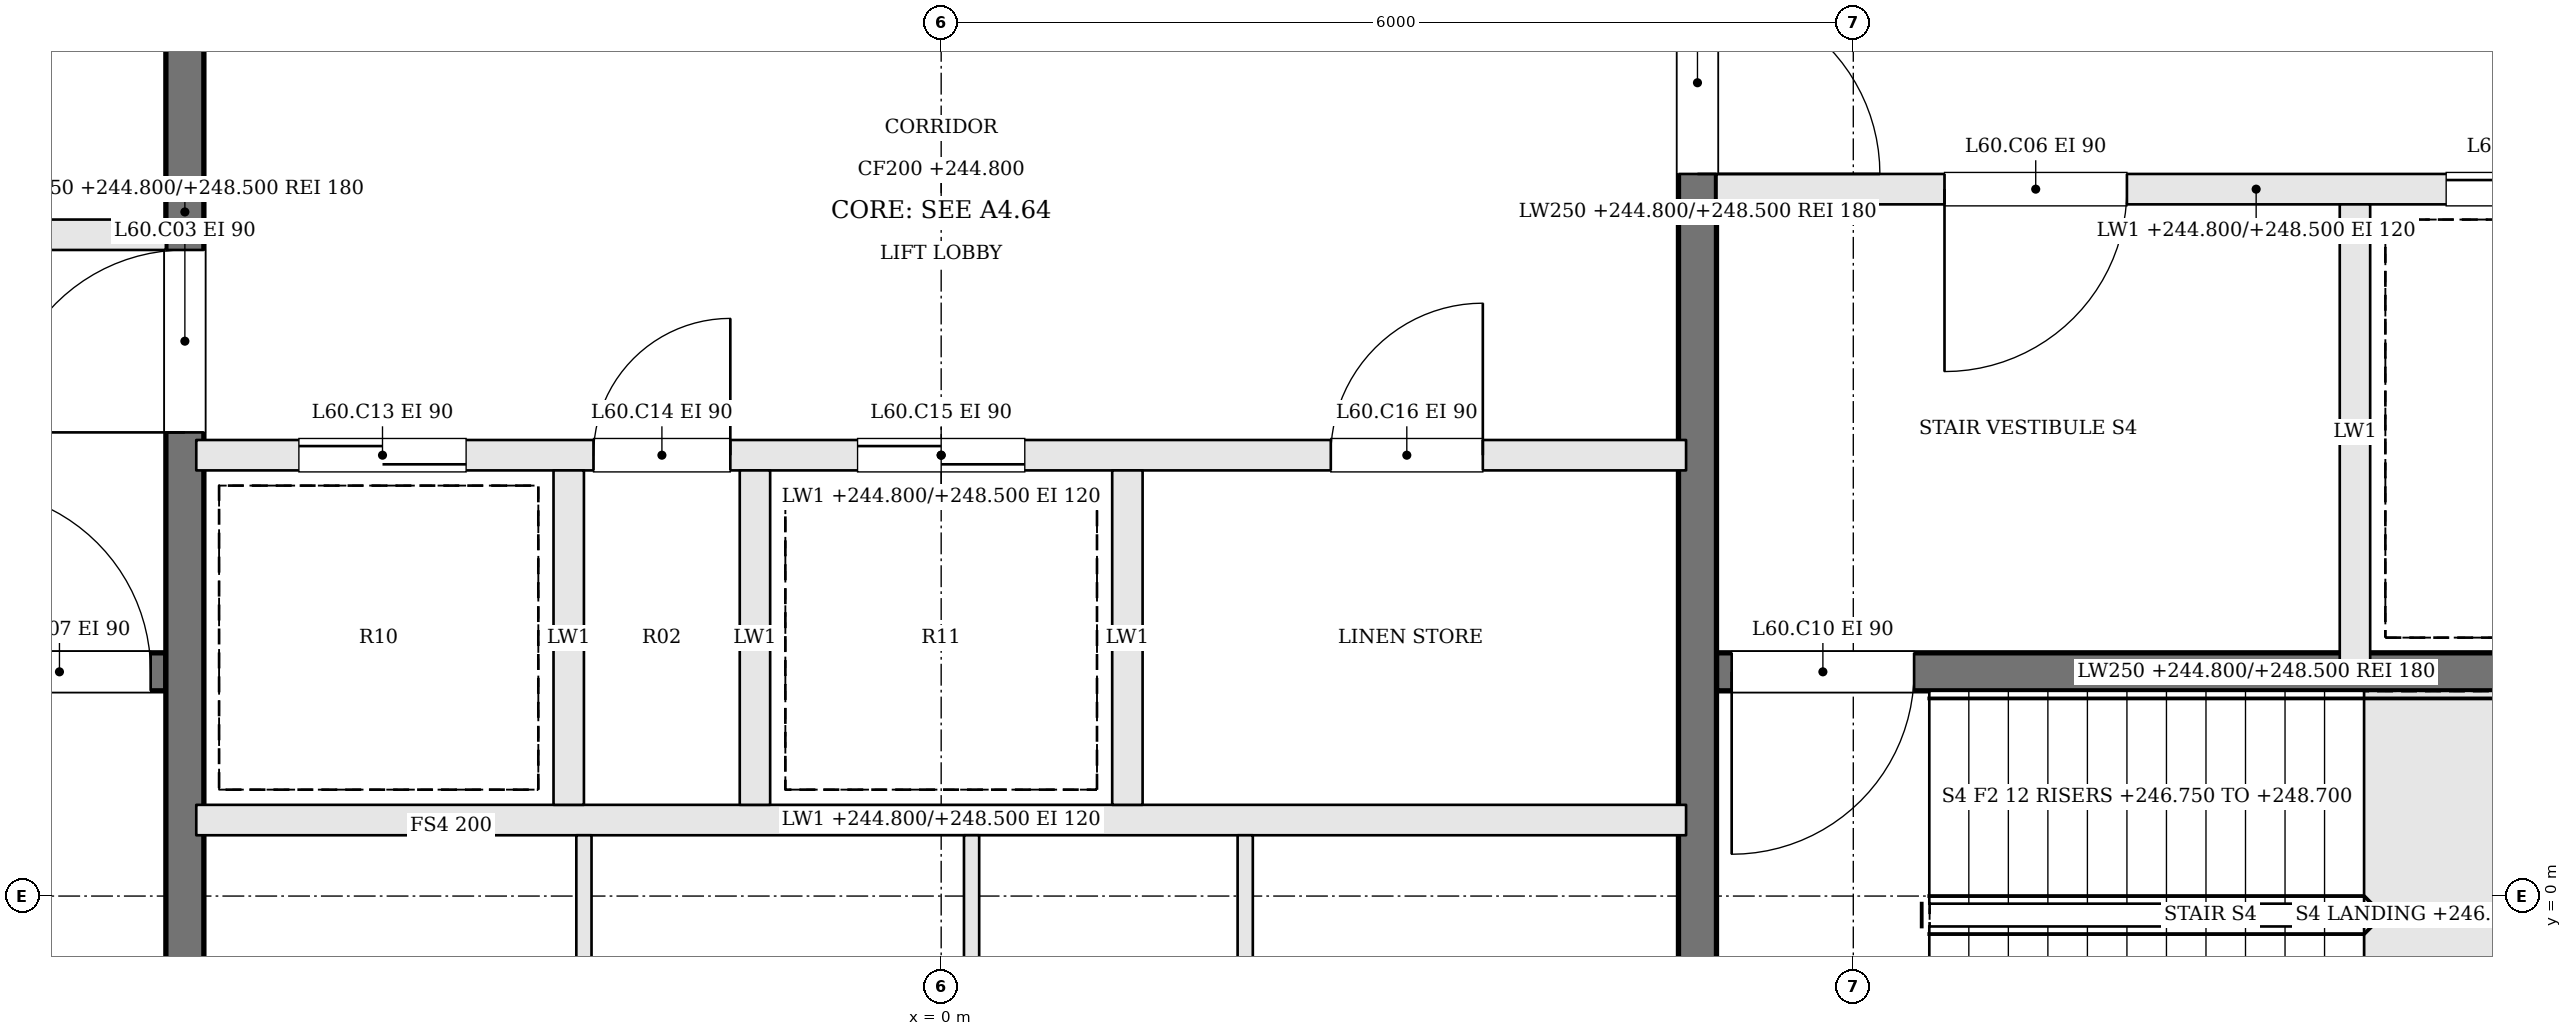
"""IFC4 building model, lengths in metres.
Left out: names, types, materials, properties, quantities, classifications, styles, units other than length and angle.
Written with IfcOpenShell. Run it as: python <this file> out.ifc"""

import sys

from ifc_helpers import new_model, si_unit, direction, frame, frame_2d, origin, place, context, subcontext, project, spatial, rectangle, extrude, element, fill, save


model = new_model("IFC4")
c1 = context("Model", 3, precision=1e-05, world=origin(), true_north=direction((0.0, 1.0)))
c2 = subcontext(c1, "Body", "Model", "MODEL_VIEW")
j1 = project(units=[si_unit("LENGTHUNIT", "METRE"), si_unit("PLANEANGLEUNIT", "RADIAN")], contexts=[c1])
p1 = place(None, origin())
s1 = spatial("IfcSite", under=j1, at=p1, CompositionType="ELEMENT")
p2 = place(p1, origin())
s2 = spatial("IfcBuilding", under=s1, at=p2, CompositionType="ELEMENT")
p3 = place(p2, frame((0.0, 0.0, 244.8)))
s3 = spatial("IfcBuildingStorey", under=s2, at=p3, CompositionType="ELEMENT", Elevation=244.8)
p4 = place(p3, frame((-12.2, 1.475, 0.0), z_axis=(0.0, 0.0, 1.0), x_axis=(1.0, 0.0, 0.0)))
e1 = element("IfcWall", 1, at=p4, inside=s3, PredefinedType="SOLIDWALL", context=c2, shape_type="SweptSolid", body=[
    extrude(rectangle(XDim=7.1, YDim=0.25, at=frame_2d((3.55, 0.0))), origin(), (0.0, 0.0, 1.0), 3.7),
])
p5 = place(p4, frame((5.8, 0.0, 0.0)))
e2 = element("IfcOpeningElement", 2, at=p5, cuts=e1, PredefinedType="OPENING", context=c2, shape_type="SweptSolid", body=[
    extrude(rectangle(XDim=1.2, YDim=2.1, at=frame_2d((0.6, 1.05))), frame((0.0, 0.135, 0.0), z_axis=(0.0, -1.0, 0.0), x_axis=(1.0, 0.0, 0.0)), (0.0, 0.0, 1.0), 0.27),
])
p6 = place(p3, frame((-12.2, 4.35, 0.0), z_axis=(0.0, 0.0, 1.0), x_axis=(1.0, 0.0, 0.0)))
e3 = element("IfcWall", 3, at=p6, inside=s3, PredefinedType="SOLIDWALL", context=c2, shape_type="SweptSolid", body=[
    extrude(rectangle(XDim=7.1, YDim=0.2, at=frame_2d((3.55, 0.0))), origin(), (0.0, 0.0, 1.0), 3.7),
])
p7 = place(p6, frame((4.4, 0.0, 0.0)))
e4 = element("IfcOpeningElement", 4, at=p7, cuts=e3, PredefinedType="OPENING", context=c2, shape_type="SweptSolid", body=[
    extrude(rectangle(XDim=1.2, YDim=2.1, at=frame_2d((0.6, 1.05))), frame((0.0, 0.11, 0.0), z_axis=(0.0, -1.0, 0.0), x_axis=(1.0, 0.0, 0.0)), (0.0, 0.0, 1.0), 0.22),
])
p8 = place(p6, frame((1.1, 0.0, 0.0)))
e5 = element("IfcOpeningElement", 5, at=p8, cuts=e3, PredefinedType="OPENING", context=c2, shape_type="SweptSolid", body=[
    extrude(rectangle(XDim=1.2, YDim=2.1, at=frame_2d((0.6, 1.05))), frame((0.0, 0.11, 0.0), z_axis=(0.0, -1.0, 0.0), x_axis=(1.0, 0.0, 0.0)), (0.0, 0.0, 1.0), 0.22),
])
p9 = place(p3, frame((12.2, 4.65, 0.0), z_axis=(0.0, 0.0, 1.0), x_axis=(-1.0, 0.0, 0.0)))
e6 = element("IfcWall", 6, at=p9, inside=s3, PredefinedType="SOLIDWALL", context=c2, shape_type="SweptSolid", body=[
    extrude(rectangle(XDim=7.1, YDim=0.2, at=frame_2d((3.55, 0.0))), origin(), (0.0, 0.0, 1.0), 3.7),
])
p10 = place(p9, frame((4.4, 0.0, 0.0)))
e7 = element("IfcOpeningElement", 7, at=p10, cuts=e6, PredefinedType="OPENING", context=c2, shape_type="SweptSolid", body=[
    extrude(rectangle(XDim=1.2, YDim=2.1, at=frame_2d((0.6, 1.05))), frame((0.0, 0.11, 0.0), z_axis=(0.0, -1.0, 0.0), x_axis=(1.0, 0.0, 0.0)), (0.0, 0.0, 1.0), 0.22),
])
p11 = place(p9, frame((1.1, 0.0, 0.0)))
e8 = element("IfcOpeningElement", 8, at=p11, cuts=e6, PredefinedType="OPENING", context=c2, shape_type="SweptSolid", body=[
    extrude(rectangle(XDim=1.2, YDim=2.1, at=frame_2d((0.6, 1.05))), frame((0.0, 0.11, 0.0), z_axis=(0.0, -1.0, 0.0), x_axis=(1.0, 0.0, 0.0)), (0.0, 0.0, 1.0), 0.22),
])
p12 = place(p3, frame((12.2, 1.475, 0.0), z_axis=(0.0, 0.0, 1.0), x_axis=(-1.0, 0.0, 0.0)))
e9 = element("IfcWall", 9, at=p12, inside=s3, PredefinedType="SOLIDWALL", context=c2, shape_type="SweptSolid", body=[
    extrude(rectangle(XDim=7.1, YDim=0.25, at=frame_2d((3.55, 0.0))), origin(), (0.0, 0.0, 1.0), 3.7),
])
p13 = place(p12, frame((5.8, 0.0, 0.0)))
e10 = element("IfcOpeningElement", 10, at=p13, cuts=e9, PredefinedType="OPENING", context=c2, shape_type="SweptSolid", body=[
    extrude(rectangle(XDim=1.2, YDim=2.1, at=frame_2d((0.6, 1.05))), frame((0.0, 0.135, 0.0), z_axis=(0.0, -1.0, 0.0), x_axis=(1.0, 0.0, 0.0)), (0.0, 0.0, 1.0), 0.27),
])
p14 = place(p3, frame((9.3, 4.55, 0.0), z_axis=(0.0, 0.0, 1.0), x_axis=(0.0, -1.0, 0.0)))
e11 = element("IfcWall", 11, at=p14, inside=s3, PredefinedType="SOLIDWALL", context=c2, shape_type="SweptSolid", body=[
    extrude(rectangle(XDim=3.0, YDim=0.2, at=frame_2d((1.5, 0.0))), origin(), (0.0, 0.0, 1.0), 3.7),
])
p15 = place(p3, frame((-4.975, -2.2, 0.0), z_axis=(0.0, 0.0, 1.0), x_axis=(0.0, 1.0, 0.0)))
e12 = element("IfcWall", 12, at=p15, inside=s3, PredefinedType="SOLIDWALL", context=c2, shape_type="SweptSolid", body=[
    extrude(rectangle(XDim=13.4, YDim=0.25, at=frame_2d((6.7, 0.0))), origin(), (0.0, 0.0, 1.0), 3.7),
])
p16 = place(p15, frame((5.25, 0.0, 0.0)))
e13 = element("IfcOpeningElement", 13, at=p16, cuts=e12, PredefinedType="OPENING", context=c2, shape_type="SweptSolid", body=[
    extrude(rectangle(XDim=1.2, YDim=2.1, at=frame_2d((0.6, 1.05))), frame((0.0, 0.135, 0.0), z_axis=(0.0, -1.0, 0.0), x_axis=(1.0, 0.0, 0.0)), (0.0, 0.0, 1.0), 0.27),
])
p17 = place(p3, frame((4.975, 11.2, 0.0), z_axis=(0.0, 0.0, 1.0), x_axis=(0.0, -1.0, 0.0)))
e14 = element("IfcWall", 14, at=p17, inside=s3, PredefinedType="SOLIDWALL", context=c2, shape_type="SweptSolid", body=[
    extrude(rectangle(XDim=13.4, YDim=0.25, at=frame_2d((6.7, 0.0))), origin(), (0.0, 0.0, 1.0), 3.7),
])
p18 = place(p17, frame((5.25, 0.0, 0.0)))
e15 = element("IfcOpeningElement", 15, at=p18, cuts=e14, PredefinedType="OPENING", context=c2, shape_type="SweptSolid", body=[
    extrude(rectangle(XDim=1.2, YDim=2.1, at=frame_2d((0.6, 1.05))), frame((0.0, 0.135, 0.0), z_axis=(0.0, -1.0, 0.0), x_axis=(1.0, 0.0, 0.0)), (0.0, 0.0, 1.0), 0.27),
])
p19 = place(p3, frame((-4.9, 0.5, 0.0), z_axis=(0.0, 0.0, 1.0), x_axis=(1.0, 0.0, 0.0)))
e16 = element("IfcWall", 16, at=p19, inside=s3, PredefinedType="SOLIDWALL", context=c2, shape_type="SweptSolid", body=[
    extrude(rectangle(XDim=9.8, YDim=0.2, at=frame_2d((4.9, 0.0))), origin(), (0.0, 0.0, 1.0), 3.7),
])
p20 = place(p3, frame((-4.9, 2.9, 0.0), z_axis=(0.0, 0.0, 1.0), x_axis=(1.0, 0.0, 0.0)))
e17 = element("IfcWall", 17, at=p20, inside=s3, PredefinedType="SOLIDWALL", context=c2, shape_type="SweptSolid", body=[
    extrude(rectangle(XDim=9.8, YDim=0.2, at=frame_2d((4.9, 0.0))), origin(), (0.0, 0.0, 1.0), 3.7),
])
p21 = place(p20, frame((0.675, 0.0, 0.0)))
e18 = element("IfcOpeningElement", 18, at=p21, cuts=e17, PredefinedType="OPENING", context=c2, shape_type="SweptSolid", body=[
    extrude(rectangle(XDim=1.1, YDim=2.1, at=frame_2d((0.55, 1.05))), frame((0.0, 0.11, 0.0), z_axis=(0.0, -1.0, 0.0), x_axis=(1.0, 0.0, 0.0)), (0.0, 0.0, 1.0), 0.22),
])
p22 = place(p20, frame((2.613, 0.0, 0.0)))
e19 = element("IfcOpeningElement", 19, at=p22, cuts=e17, PredefinedType="OPENING", context=c2, shape_type="SweptSolid", body=[
    extrude(rectangle(XDim=0.9, YDim=2.1, at=frame_2d((0.45, 1.05))), frame((0.0, 0.11, 0.0), z_axis=(0.0, -1.0, 0.0), x_axis=(1.0, 0.0, 0.0)), (0.0, 0.0, 1.0), 0.22),
])
p23 = place(p20, frame((4.35, 0.0, 0.0)))
e20 = element("IfcOpeningElement", 20, at=p23, cuts=e17, PredefinedType="OPENING", context=c2, shape_type="SweptSolid", body=[
    extrude(rectangle(XDim=1.1, YDim=2.1, at=frame_2d((0.55, 1.05))), frame((0.0, 0.11, 0.0), z_axis=(0.0, -1.0, 0.0), x_axis=(1.0, 0.0, 0.0)), (0.0, 0.0, 1.0), 0.22),
])
p24 = place(p20, frame((7.463, 0.0, 0.0)))
e21 = element("IfcOpeningElement", 21, at=p24, cuts=e17, PredefinedType="OPENING", context=c2, shape_type="SweptSolid", body=[
    extrude(rectangle(XDim=1.0, YDim=2.1, at=frame_2d((0.5, 1.05))), frame((0.0, 0.11, 0.0), z_axis=(0.0, -1.0, 0.0), x_axis=(1.0, 0.0, 0.0)), (0.0, 0.0, 1.0), 0.22),
])
for number, where, z_axis, x_axis in (
    (22, (-2.45, 0.6, 0.0), (0.0, 0.0, 1.0), (0.0, 1.0, 0.0)),
    (23, (-1.225, 0.6, 0.0), (0.0, 0.0, 1.0), (0.0, 1.0, 0.0)),
    (24, (1.225, 0.6, 0.0), (0.0, 0.0, 1.0), (0.0, 1.0, 0.0)),
):
    element("IfcWall", number, at=place(p3, frame(where, z_axis=z_axis, x_axis=x_axis)), inside=s3, PredefinedType="SOLIDWALL", context=c2, shape_type="SweptSolid", body=[
        extrude(rectangle(XDim=2.2, YDim=0.2, at=frame_2d((1.1, 0.0))), origin(), (0.0, 0.0, 1.0), 3.7),
    ])
for number, where, z_axis, x_axis in (
    (25, (-2.35, -2.2, 0.0), (0.0, 0.0, 1.0), (0.0, 1.0, 0.0)),
    (26, (0.2, -2.2, 0.0), (0.0, 0.0, 1.0), (0.0, 1.0, 0.0)),
    (27, (2.0, -2.2, 0.0), (0.0, 0.0, 1.0), (0.0, 1.0, 0.0)),
):
    element("IfcWall", number, at=place(p3, frame(where, z_axis=z_axis, x_axis=x_axis)), inside=s3, PredefinedType="PARTITIONING", context=c2, shape_type="SweptSolid", body=[
        extrude(rectangle(XDim=2.6, YDim=0.1, at=frame_2d((1.3, 0.0))), origin(), (0.0, 0.0, 1.0), 3.7),
    ])
p25 = place(p16, origin())
e28 = element("IfcDoor", 28, at=p25, inside=s3, OperationType="SINGLE_SWING_LEFT", PredefinedType="DOOR", context=c2, shape_type="SweptSolid", body=[
    extrude(rectangle(XDim=1.2, YDim=2.1, at=frame_2d((0.6, 1.05))), frame((0.0, 0.025, 0.0), z_axis=(0.0, -1.0, 0.0), x_axis=(1.0, 0.0, 0.0)), (0.0, 0.0, 1.0), 0.05),
])
fill(e13, e28)
p26 = place(p18, origin())
e29 = element("IfcDoor", 29, at=p26, inside=s3, OperationType="SINGLE_SWING_RIGHT", PredefinedType="DOOR", context=c2, shape_type="SweptSolid", body=[
    extrude(rectangle(XDim=1.2, YDim=2.1, at=frame_2d((0.6, 1.05))), frame((0.0, 0.025, 0.0), z_axis=(0.0, -1.0, 0.0), x_axis=(1.0, 0.0, 0.0)), (0.0, 0.0, 1.0), 0.05),
])
fill(e15, e29)
p27 = place(p10, origin())
e30 = element("IfcDoor", 30, at=p27, inside=s3, OperationType="SINGLE_SWING_RIGHT", PredefinedType="DOOR", context=c2, shape_type="SweptSolid", body=[
    extrude(rectangle(XDim=1.2, YDim=2.1, at=frame_2d((0.6, 1.05))), frame((0.0, 0.025, 0.0), z_axis=(0.0, -1.0, 0.0), x_axis=(1.0, 0.0, 0.0)), (0.0, 0.0, 1.0), 0.05),
])
fill(e7, e30)
p28 = place(p5, origin())
e31 = element("IfcDoor", 31, at=p28, inside=s3, OperationType="SINGLE_SWING_LEFT", PredefinedType="DOOR", context=c2, shape_type="SweptSolid", body=[
    extrude(rectangle(XDim=1.2, YDim=2.1, at=frame_2d((0.6, 1.05))), frame((0.0, 0.025, 0.0), z_axis=(0.0, -1.0, 0.0), x_axis=(1.0, 0.0, 0.0)), (0.0, 0.0, 1.0), 0.05),
])
fill(e2, e31)
p29 = place(p13, origin())
e32 = element("IfcDoor", 32, at=p29, inside=s3, OperationType="SINGLE_SWING_RIGHT", PredefinedType="DOOR", context=c2, shape_type="SweptSolid", body=[
    extrude(rectangle(XDim=1.2, YDim=2.1, at=frame_2d((0.6, 1.05))), frame((0.0, 0.025, 0.0), z_axis=(0.0, -1.0, 0.0), x_axis=(1.0, 0.0, 0.0)), (0.0, 0.0, 1.0), 0.05),
])
fill(e10, e32)
p30 = place(p11, origin())
e33 = element("IfcDoor", 33, at=p30, inside=s3, OperationType="SLIDING_TO_RIGHT", PredefinedType="DOOR", context=c2, shape_type="SweptSolid", body=[
    extrude(rectangle(XDim=1.2, YDim=2.1, at=frame_2d((0.6, 1.05))), frame((0.0, 0.025, 0.0), z_axis=(0.0, -1.0, 0.0), x_axis=(1.0, 0.0, 0.0)), (0.0, 0.0, 1.0), 0.05),
])
fill(e8, e33)
p31 = place(p21, origin())
e34 = element("IfcDoor", 34, at=p31, inside=s3, OperationType="SLIDING_TO_RIGHT", PredefinedType="DOOR", context=c2, shape_type="SweptSolid", body=[
    extrude(rectangle(XDim=1.1, YDim=2.1, at=frame_2d((0.55, 1.05))), frame((0.0, 0.025, 0.0), z_axis=(0.0, -1.0, 0.0), x_axis=(1.0, 0.0, 0.0)), (0.0, 0.0, 1.0), 0.05),
])
fill(e18, e34)
p32 = place(p22, origin())
e35 = element("IfcDoor", 35, at=p32, inside=s3, OperationType="SINGLE_SWING_RIGHT", PredefinedType="DOOR", context=c2, shape_type="SweptSolid", body=[
    extrude(rectangle(XDim=0.9, YDim=2.1, at=frame_2d((0.45, 1.05))), frame((0.0, 0.025, 0.0), z_axis=(0.0, -1.0, 0.0), x_axis=(1.0, 0.0, 0.0)), (0.0, 0.0, 1.0), 0.05),
])
fill(e19, e35)
p33 = place(p23, origin())
e36 = element("IfcDoor", 36, at=p33, inside=s3, OperationType="SLIDING_TO_LEFT", PredefinedType="DOOR", context=c2, shape_type="SweptSolid", body=[
    extrude(rectangle(XDim=1.1, YDim=2.1, at=frame_2d((0.55, 1.05))), frame((0.0, 0.025, 0.0), z_axis=(0.0, -1.0, 0.0), x_axis=(1.0, 0.0, 0.0)), (0.0, 0.0, 1.0), 0.05),
])
fill(e20, e36)
p34 = place(p24, origin())
e37 = element("IfcDoor", 37, at=p34, inside=s3, OperationType="SINGLE_SWING_RIGHT", PredefinedType="DOOR", context=c2, shape_type="SweptSolid", body=[
    extrude(rectangle(XDim=1.0, YDim=2.1, at=frame_2d((0.5, 1.05))), frame((0.0, 0.025, 0.0), z_axis=(0.0, -1.0, 0.0), x_axis=(1.0, 0.0, 0.0)), (0.0, 0.0, 1.0), 0.05),
])
fill(e21, e37)
save(model, sys.argv[1])
